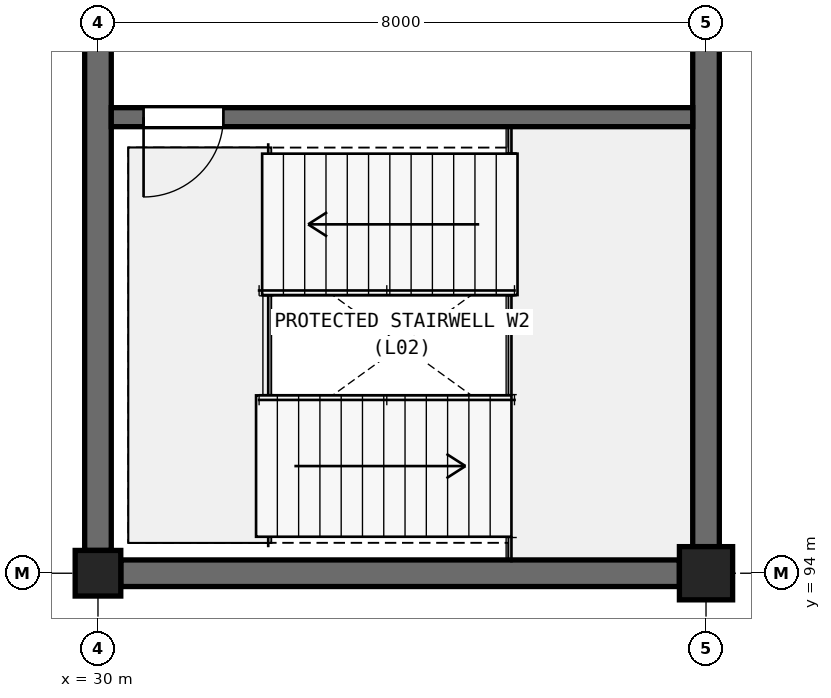
"""IFC4 building model, lengths in metres.
Left out: names, types, materials, properties, quantities, classifications, styles, units other than length and angle.
Written with IfcOpenShell. Run it as: python <this file> out.ifc"""

import sys

from ifc_helpers import new_model, si_unit, direction, frame, frame_2d, origin, origin_2d, place, context, subcontext, project, spatial, rectangle, extrude, element, fill, save


model = new_model("IFC4")
c1 = context("Model", 3, precision=1e-05, world=origin(), true_north=direction((0.0, 1.0)))
c2 = subcontext(c1, "Body", "Model", "MODEL_VIEW")
j1 = project(units=[si_unit("LENGTHUNIT", "METRE"), si_unit("PLANEANGLEUNIT", "RADIAN")], contexts=[c1])
p1 = place(None, origin())
s1 = spatial("IfcSite", under=j1, at=p1, CompositionType="ELEMENT")
p2 = place(p1, origin())
s2 = spatial("IfcBuilding", under=s1, at=p2, CompositionType="ELEMENT")
p3 = place(p2, frame((0.0, 0.0, 10.8)))
s3 = spatial("IfcBuildingStorey", under=s2, at=p3, CompositionType="ELEMENT", Elevation=10.8)
p4 = place(p3, frame((30.0, 94.0, 0.0), z_axis=(0.0, 0.0, 1.0), x_axis=(1.0, 0.0, 0.0)))
e1 = element("IfcColumn", 1, at=p4, inside=s3, PredefinedType="COLUMN", context=c2, shape_type="SweptSolid", body=[
    extrude(rectangle(XDim=0.6, YDim=0.6, at=origin_2d()), origin(), (0.0, 0.0, 1.0), 4.2),
])
p5 = place(p3, frame((38.0, 94.0, 0.0), z_axis=(0.0, 0.0, 1.0), x_axis=(1.0, 0.0, 0.0)))
e2 = element("IfcColumn", 2, at=p5, inside=s3, PredefinedType="COLUMN", context=c2, shape_type="SweptSolid", body=[
    extrude(rectangle(XDim=0.7, YDim=0.7, at=origin_2d()), origin(), (0.0, 0.0, 1.0), 4.2),
])
for number, where, z_axis, x_axis in (
    (3, (30.3, 94.0, 0.0), (0.0, 0.0, 1.0), (1.0, 0.0, 0.0)),
    (4, (30.0, 94.3, 0.0), (0.0, 0.0, 1.0), (0.0, 1.0, 0.0)),
):
    element("IfcWall", number, at=place(p3, frame(where, z_axis=z_axis, x_axis=x_axis)), inside=s3, PredefinedType="SHEAR", context=c2, shape_type="SweptSolid", body=[
        extrude(rectangle(XDim=7.35, YDim=0.35, at=frame_2d((3.675, 0.0))), origin(), (0.0, 0.0, 1.0), 3.98),
    ])
p6 = place(p3, frame((38.0, 94.35, 0.0), z_axis=(0.0, 0.0, 1.0), x_axis=(0.0, 1.0, 0.0)))
e5 = element("IfcWall", 5, at=p6, inside=s3, PredefinedType="SHEAR", context=c2, shape_type="SweptSolid", body=[
    extrude(rectangle(XDim=7.325, YDim=0.35, at=frame_2d((3.663, 0.0))), origin(), (0.0, 0.0, 1.0), 3.98),
])
p7 = place(p3, frame((30.175, 100.0, 0.0), z_axis=(0.0, 0.0, 1.0), x_axis=(1.0, 0.0, 0.0)))
e6 = element("IfcWall", 6, at=p7, inside=s3, PredefinedType="SOLIDWALL", context=c2, shape_type="SweptSolid", body=[
    extrude(rectangle(XDim=7.65, YDim=0.25, at=frame_2d((3.825, 0.0))), origin(), (0.0, 0.0, 1.0), 3.98),
])
p8 = place(p7, frame((0.425, 0.0, 0.0)))
e7 = element("IfcOpeningElement", 7, at=p8, cuts=e6, PredefinedType="OPENING", context=c2, shape_type="SweptSolid", body=[
    extrude(rectangle(XDim=1.05, YDim=2.2, at=frame_2d((0.525, 1.1))), frame((0.0, 0.135, 0.0), z_axis=(0.0, -1.0, 0.0), x_axis=(1.0, 0.0, 0.0)), (0.0, 0.0, 1.0), 0.27),
])
p9 = place(p8, frame((1.05, 0.0, 0.0), z_axis=(0.0, 0.0, 1.0), x_axis=(-1.0, 0.0, 0.0)))
e8 = element("IfcDoor", 8, at=p9, inside=s3, OperationType="SINGLE_SWING_LEFT", PredefinedType="DOOR", context=c2, shape_type="SweptSolid", body=[
    extrude(rectangle(XDim=1.05, YDim=2.2, at=frame_2d((0.525, 1.1))), frame((0.0, 0.025, 0.0), z_axis=(0.0, -1.0, 0.0), x_axis=(1.0, 0.0, 0.0)), (0.0, 0.0, 1.0), 0.05),
])
fill(e7, e8)
save(model, sys.argv[1])
